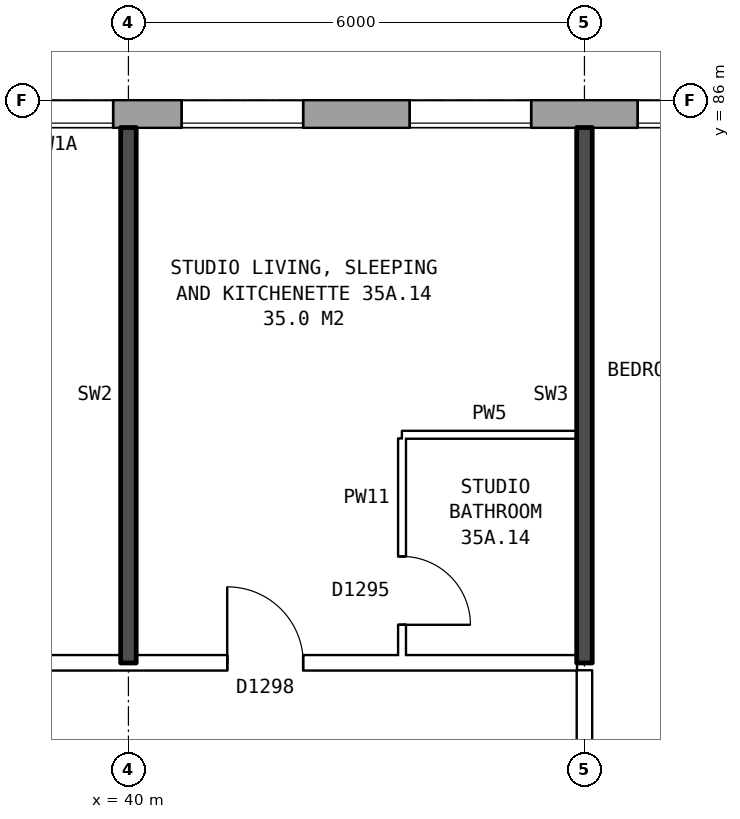
"""IFC4 building model, lengths in metres.
Left out: names, types, materials, properties, quantities, classifications, styles, units other than length and angle.
Written with IfcOpenShell. Run it as: python <this file> out.ifc"""

import sys

from ifc_helpers import new_model, si_unit, direction, frame, frame_2d, origin, place, context, subcontext, project, spatial, rectangle, extrude, element, fill, save


model = new_model("IFC4")
c1 = context("Model", 3, precision=1e-05, world=origin(), true_north=direction((0.0, 1.0)))
c2 = subcontext(c1, "Body", "Model", "MODEL_VIEW")
j1 = project(units=[si_unit("LENGTHUNIT", "METRE"), si_unit("PLANEANGLEUNIT", "RADIAN")], contexts=[c1])
p1 = place(None, origin())
s1 = spatial("IfcSite", under=j1, at=p1, CompositionType="ELEMENT")
p2 = place(p1, origin())
s2 = spatial("IfcBuilding", under=s1, at=p2, CompositionType="ELEMENT")
p3 = place(p2, frame((0.0, 0.0, 126.8)))
s3 = spatial("IfcBuildingStorey", under=s2, at=p3, CompositionType="ELEMENT", Elevation=126.8)
p4 = place(p3, frame((72.925, 85.82, 0.0), z_axis=(0.0, 0.0, 1.0), x_axis=(-1.0, 0.0, 0.0)))
e1 = element("IfcWall", 1, at=p4, inside=s3, PredefinedType="STANDARD", context=c2, shape_type="SweptSolid", body=[
    extrude(rectangle(XDim=43.101, YDim=0.36, at=frame_2d((21.55, 0.0))), origin(), (0.0, 0.0, 1.0), 2.85),
])
p5 = place(p4, frame((0.625, 0.0, 0.8)))
e2 = element("IfcOpeningElement", 2, at=p5, cuts=e1, PredefinedType="OPENING", context=c2, shape_type="SweptSolid", body=[
    extrude(rectangle(XDim=1.6, YDim=1.8, at=frame_2d((0.8, 0.9))), frame((0.0, 0.19, 0.0), z_axis=(0.0, -1.0, 0.0), x_axis=(1.0, 0.0, 0.0)), (0.0, 0.0, 1.0), 0.38),
])
p6 = place(p4, frame((3.625, 0.0, 0.8)))
e3 = element("IfcOpeningElement", 3, at=p6, cuts=e1, PredefinedType="OPENING", context=c2, shape_type="SweptSolid", body=[
    extrude(rectangle(XDim=1.6, YDim=1.8, at=frame_2d((0.8, 0.9))), frame((0.0, 0.19, 0.0), z_axis=(0.0, -1.0, 0.0), x_axis=(1.0, 0.0, 0.0)), (0.0, 0.0, 1.0), 0.38),
])
p7 = place(p4, frame((5.525, 0.0, 1.7)))
e4 = element("IfcOpeningElement", 4, at=p7, cuts=e1, PredefinedType="OPENING", context=c2, shape_type="SweptSolid", body=[
    extrude(rectangle(XDim=0.8, YDim=0.9, at=frame_2d((0.4, 0.45))), frame((0.0, 0.19, 0.0), z_axis=(0.0, -1.0, 0.0), x_axis=(1.0, 0.0, 0.0)), (0.0, 0.0, 1.0), 0.38),
])
p8 = place(p4, frame((9.625, 0.0, 0.8)))
e5 = element("IfcOpeningElement", 5, at=p8, cuts=e1, PredefinedType="OPENING", context=c2, shape_type="SweptSolid", body=[
    extrude(rectangle(XDim=1.6, YDim=1.8, at=frame_2d((0.8, 0.9))), frame((0.0, 0.19, 0.0), z_axis=(0.0, -1.0, 0.0), x_axis=(1.0, 0.0, 0.0)), (0.0, 0.0, 1.0), 0.38),
])
p9 = place(p4, frame((12.625, 0.0, 0.8)))
e6 = element("IfcOpeningElement", 6, at=p9, cuts=e1, PredefinedType="OPENING", context=c2, shape_type="SweptSolid", body=[
    extrude(rectangle(XDim=1.6, YDim=1.8, at=frame_2d((0.8, 0.9))), frame((0.0, 0.19, 0.0), z_axis=(0.0, -1.0, 0.0), x_axis=(1.0, 0.0, 0.0)), (0.0, 0.0, 1.0), 0.38),
])
p10 = place(p4, frame((15.625, 0.0, 0.8)))
e7 = element("IfcOpeningElement", 7, at=p10, cuts=e1, PredefinedType="OPENING", context=c2, shape_type="SweptSolid", body=[
    extrude(rectangle(XDim=1.6, YDim=1.8, at=frame_2d((0.8, 0.9))), frame((0.0, 0.19, 0.0), z_axis=(0.0, -1.0, 0.0), x_axis=(1.0, 0.0, 0.0)), (0.0, 0.0, 1.0), 0.38),
])
p11 = place(p4, frame((18.625, 0.0, 0.8)))
e8 = element("IfcOpeningElement", 8, at=p11, cuts=e1, PredefinedType="OPENING", context=c2, shape_type="SweptSolid", body=[
    extrude(rectangle(XDim=1.6, YDim=1.8, at=frame_2d((0.8, 0.9))), frame((0.0, 0.19, 0.0), z_axis=(0.0, -1.0, 0.0), x_axis=(1.0, 0.0, 0.0)), (0.0, 0.0, 1.0), 0.38),
])
p12 = place(p4, frame((21.625, 0.0, 0.8)))
e9 = element("IfcOpeningElement", 9, at=p12, cuts=e1, PredefinedType="OPENING", context=c2, shape_type="SweptSolid", body=[
    extrude(rectangle(XDim=1.6, YDim=1.8, at=frame_2d((0.8, 0.9))), frame((0.0, 0.19, 0.0), z_axis=(0.0, -1.0, 0.0), x_axis=(1.0, 0.0, 0.0)), (0.0, 0.0, 1.0), 0.38),
])
p13 = place(p4, frame((24.625, 0.0, 0.8)))
e10 = element("IfcOpeningElement", 10, at=p13, cuts=e1, PredefinedType="OPENING", context=c2, shape_type="SweptSolid", body=[
    extrude(rectangle(XDim=1.6, YDim=1.8, at=frame_2d((0.8, 0.9))), frame((0.0, 0.19, 0.0), z_axis=(0.0, -1.0, 0.0), x_axis=(1.0, 0.0, 0.0)), (0.0, 0.0, 1.0), 0.38),
])
p14 = place(p4, frame((27.625, 0.0, 0.8)))
e11 = element("IfcOpeningElement", 11, at=p14, cuts=e1, PredefinedType="OPENING", context=c2, shape_type="SweptSolid", body=[
    extrude(rectangle(XDim=1.6, YDim=1.8, at=frame_2d((0.8, 0.9))), frame((0.0, 0.19, 0.0), z_axis=(0.0, -1.0, 0.0), x_axis=(1.0, 0.0, 0.0)), (0.0, 0.0, 1.0), 0.38),
])
p15 = place(p4, frame((30.625, 0.0, 0.8)))
e12 = element("IfcOpeningElement", 12, at=p15, cuts=e1, PredefinedType="OPENING", context=c2, shape_type="SweptSolid", body=[
    extrude(rectangle(XDim=1.6, YDim=1.8, at=frame_2d((0.8, 0.9))), frame((0.0, 0.19, 0.0), z_axis=(0.0, -1.0, 0.0), x_axis=(1.0, 0.0, 0.0)), (0.0, 0.0, 1.0), 0.38),
])
p16 = place(p4, frame((33.125, 0.0, 0.8)))
e13 = element("IfcOpeningElement", 13, at=p16, cuts=e1, PredefinedType="OPENING", context=c2, shape_type="SweptSolid", body=[
    extrude(rectangle(XDim=1.4, YDim=1.8, at=frame_2d((0.7, 0.9))), frame((0.0, 0.19, 0.0), z_axis=(0.0, -1.0, 0.0), x_axis=(1.0, 0.0, 0.0)), (0.0, 0.0, 1.0), 0.38),
])
p17 = place(p4, frame((34.825, 0.0, 0.8)))
e14 = element("IfcOpeningElement", 14, at=p17, cuts=e1, PredefinedType="OPENING", context=c2, shape_type="SweptSolid", body=[
    extrude(rectangle(XDim=0.6, YDim=0.9, at=frame_2d((0.3, 0.45))), frame((0.0, 0.19, 0.0), z_axis=(0.0, -1.0, 0.0), x_axis=(1.0, 0.0, 0.0)), (0.0, 0.0, 1.0), 0.38),
])
p18 = place(p4, frame((39.625, 0.0, 0.8)))
e15 = element("IfcOpeningElement", 15, at=p18, cuts=e1, PredefinedType="OPENING", context=c2, shape_type="SweptSolid", body=[
    extrude(rectangle(XDim=1.6, YDim=1.8, at=frame_2d((0.8, 0.9))), frame((0.0, 0.19, 0.0), z_axis=(0.0, -1.0, 0.0), x_axis=(1.0, 0.0, 0.0)), (0.0, 0.0, 1.0), 0.38),
])
p19 = place(p4, frame((7.525, 0.0, 0.8)))
e16 = element("IfcOpeningElement", 16, at=p19, cuts=e1, PredefinedType="OPENING", context=c2, shape_type="SweptSolid", body=[
    extrude(rectangle(XDim=1.2, YDim=0.9, at=frame_2d((0.6, 0.45))), frame((0.0, 0.19, 0.0), z_axis=(0.0, -1.0, 0.0), x_axis=(1.0, 0.0, 0.0)), (0.0, 0.0, 1.0), 0.38),
])
p20 = place(p4, frame((36.725, 0.0, 1.7)))
e17 = element("IfcOpeningElement", 17, at=p20, cuts=e1, PredefinedType="OPENING", context=c2, shape_type="SweptSolid", body=[
    extrude(rectangle(XDim=0.6, YDim=0.9, at=frame_2d((0.3, 0.45))), frame((0.0, 0.19, 0.0), z_axis=(0.0, -1.0, 0.0), x_axis=(1.0, 0.0, 0.0)), (0.0, 0.0, 1.0), 0.38),
])
p21 = place(p4, frame((37.725, 0.0, 0.8)))
e18 = element("IfcOpeningElement", 18, at=p21, cuts=e1, PredefinedType="OPENING", context=c2, shape_type="SweptSolid", body=[
    extrude(rectangle(XDim=1.0, YDim=1.8, at=frame_2d((0.5, 0.9))), frame((0.0, 0.19, 0.0), z_axis=(0.0, -1.0, 0.0), x_axis=(1.0, 0.0, 0.0)), (0.0, 0.0, 1.0), 0.38),
])
p22 = place(p3, frame((27.11, 78.6, 0.0), z_axis=(0.0, 0.0, 1.0), x_axis=(1.0, 0.0, 0.0)))
e19 = element("IfcWall", 19, at=p22, inside=s3, PredefinedType="PARTITIONING", context=c2, shape_type="SweptSolid", body=[
    extrude(rectangle(XDim=18.79, YDim=0.2, at=frame_2d((9.395, 0.0))), origin(), (0.0, 0.0, 1.0), 2.85),
])
p23 = place(p22, frame((14.19, 0.0, 0.0)))
e20 = element("IfcOpeningElement", 20, at=p23, cuts=e19, PredefinedType="OPENING", context=c2, shape_type="SweptSolid", body=[
    extrude(rectangle(XDim=1.0, YDim=2.1, at=frame_2d((0.5, 1.05))), frame((0.0, 0.11, 0.0), z_axis=(0.0, -1.0, 0.0), x_axis=(1.0, 0.0, 0.0)), (0.0, 0.0, 1.0), 0.22),
])
p24 = place(p22, frame((10.39, 0.0, 0.0)))
e21 = element("IfcOpeningElement", 21, at=p24, cuts=e19, PredefinedType="OPENING", context=c2, shape_type="SweptSolid", body=[
    extrude(rectangle(XDim=1.0, YDim=2.1, at=frame_2d((0.5, 1.05))), frame((0.0, 0.11, 0.0), z_axis=(0.0, -1.0, 0.0), x_axis=(1.0, 0.0, 0.0)), (0.0, 0.0, 1.0), 0.22),
])
p25 = place(p22, frame((4.59, 0.0, 0.0)))
e22 = element("IfcOpeningElement", 22, at=p25, cuts=e19, PredefinedType="OPENING", context=c2, shape_type="SweptSolid", body=[
    extrude(rectangle(XDim=1.0, YDim=2.1, at=frame_2d((0.5, 1.05))), frame((0.0, 0.11, 0.0), z_axis=(0.0, -1.0, 0.0), x_axis=(1.0, 0.0, 0.0)), (0.0, 0.0, 1.0), 0.22),
])
p26 = place(p3, frame((43.6, 81.6, 0.0), z_axis=(0.0, 0.0, 1.0), x_axis=(1.0, 0.0, 0.0)))
e23 = element("IfcWall", 23, at=p26, inside=s3, PredefinedType="PARTITIONING", context=c2, shape_type="SweptSolid", body=[
    extrude(rectangle(XDim=2.3, YDim=0.1, at=frame_2d((1.15, 0.0))), origin(), (0.0, 0.0, 1.0), 2.85),
])
p27 = place(p3, frame((40.0, 78.6, 0.0), z_axis=(0.0, 0.0, 1.0), x_axis=(0.0, 1.0, 0.0)))
e24 = element("IfcWall", 24, at=p27, inside=s3, PredefinedType="SOLIDWALL", context=c2, shape_type="SweptSolid", body=[
    extrude(rectangle(XDim=7.04, YDim=0.2, at=frame_2d((3.52, 0.0))), origin(), (0.0, 0.0, 1.0), 2.85),
])
p28 = place(p3, frame((43.6, 78.7, 0.0), z_axis=(0.0, 0.0, 1.0), x_axis=(0.0, 1.0, 0.0)))
e25 = element("IfcWall", 25, at=p28, inside=s3, PredefinedType="PARTITIONING", context=c2, shape_type="SweptSolid", body=[
    extrude(rectangle(XDim=2.85, YDim=0.1, at=frame_2d((1.425, 0.0))), origin(), (0.0, 0.0, 1.0), 2.85),
])
p29 = place(p28, frame((0.4, 0.0, 0.0)))
e26 = element("IfcOpeningElement", 26, at=p29, cuts=e25, PredefinedType="OPENING", context=c2, shape_type="SweptSolid", body=[
    extrude(rectangle(XDim=0.9, YDim=2.1, at=frame_2d((0.45, 1.05))), frame((0.0, 0.06, 0.0), z_axis=(0.0, -1.0, 0.0), x_axis=(1.0, 0.0, 0.0)), (0.0, 0.0, 1.0), 0.12),
])
p30 = place(p3, frame((46.0, 76.3, 0.0), z_axis=(0.0, 0.0, 1.0), x_axis=(0.0, 1.0, 0.0)))
e27 = element("IfcWall", 27, at=p30, inside=s3, PredefinedType="PARTITIONING", context=c2, shape_type="SweptSolid", body=[
    extrude(rectangle(XDim=2.2, YDim=0.2, at=frame_2d((1.1, 0.0))), origin(), (0.0, 0.0, 1.0), 2.85),
])
p31 = place(p3, frame((46.0, 78.6, 0.0), z_axis=(0.0, 0.0, 1.0), x_axis=(0.0, 1.0, 0.0)))
e28 = element("IfcWall", 28, at=p31, inside=s3, PredefinedType="SOLIDWALL", context=c2, shape_type="SweptSolid", body=[
    extrude(rectangle(XDim=7.04, YDim=0.2, at=frame_2d((3.52, 0.0))), origin(), (0.0, 0.0, 1.0), 2.85),
])
p32 = place(p13, origin())
e29 = element("IfcWindow", 29, at=p32, inside=s3, PartitioningType="SINGLE_PANEL", PredefinedType="WINDOW", context=c2, shape_type="SweptSolid", body=[
    extrude(rectangle(XDim=1.6, YDim=1.8, at=frame_2d((0.8, 0.9))), frame((0.0, 0.15, 0.0), z_axis=(0.0, -1.0, 0.0), x_axis=(1.0, 0.0, 0.0)), (0.0, 0.0, 1.0), 0.06),
])
fill(e10, e29)
p33 = place(p14, origin())
e30 = element("IfcWindow", 30, at=p33, inside=s3, PartitioningType="SINGLE_PANEL", PredefinedType="WINDOW", context=c2, shape_type="SweptSolid", body=[
    extrude(rectangle(XDim=1.6, YDim=1.8, at=frame_2d((0.8, 0.9))), frame((0.0, 0.15, 0.0), z_axis=(0.0, -1.0, 0.0), x_axis=(1.0, 0.0, 0.0)), (0.0, 0.0, 1.0), 0.06),
])
fill(e11, e30)
p34 = place(p15, origin())
e31 = element("IfcWindow", 31, at=p34, inside=s3, PartitioningType="SINGLE_PANEL", PredefinedType="WINDOW", context=c2, shape_type="SweptSolid", body=[
    extrude(rectangle(XDim=1.6, YDim=1.8, at=frame_2d((0.8, 0.9))), frame((0.0, 0.15, 0.0), z_axis=(0.0, -1.0, 0.0), x_axis=(1.0, 0.0, 0.0)), (0.0, 0.0, 1.0), 0.06),
])
fill(e12, e31)
p35 = place(p16, origin())
e32 = element("IfcWindow", 32, at=p35, inside=s3, PartitioningType="SINGLE_PANEL", PredefinedType="WINDOW", context=c2, shape_type="SweptSolid", body=[
    extrude(rectangle(XDim=1.4, YDim=1.8, at=frame_2d((0.7, 0.9))), frame((0.0, 0.15, 0.0), z_axis=(0.0, -1.0, 0.0), x_axis=(1.0, 0.0, 0.0)), (0.0, 0.0, 1.0), 0.06),
])
fill(e13, e32)
p36 = place(p23, origin())
e33 = element("IfcDoor", 33, at=p36, inside=s3, OperationType="SINGLE_SWING_LEFT", PredefinedType="DOOR", context=c2, shape_type="SweptSolid", body=[
    extrude(rectangle(XDim=1.0, YDim=2.1, at=frame_2d((0.5, 1.05))), frame((0.0, 0.025, 0.0), z_axis=(0.0, -1.0, 0.0), x_axis=(1.0, 0.0, 0.0)), (0.0, 0.0, 1.0), 0.05),
])
fill(e20, e33)
p37 = place(p29, frame((0.9, 0.0, 0.0), z_axis=(0.0, 0.0, 1.0), x_axis=(-1.0, 0.0, 0.0)))
e34 = element("IfcDoor", 34, at=p37, inside=s3, OperationType="SINGLE_SWING_RIGHT", PredefinedType="DOOR", context=c2, shape_type="SweptSolid", body=[
    extrude(rectangle(XDim=0.9, YDim=2.1, at=frame_2d((0.45, 1.05))), frame((0.0, 0.025, 0.0), z_axis=(0.0, -1.0, 0.0), x_axis=(1.0, 0.0, 0.0)), (0.0, 0.0, 1.0), 0.05),
])
fill(e26, e34)
save(model, sys.argv[1])
